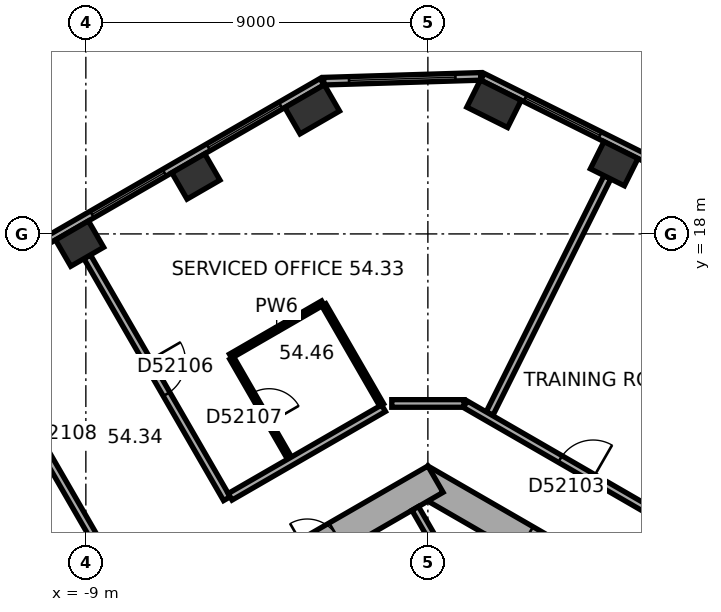
"""IFC4 building model, lengths in metres.
Left out: names, types, materials, properties, quantities, classifications, styles, units other than length and angle.
Written with IfcOpenShell. Run it as: python <this file> out.ifc"""

import sys

from ifc_helpers import new_model, si_unit, direction, frame, frame_2d, origin, origin_2d, place, context, subcontext, project, spatial, rectangle, extrude, element, fill, save


model = new_model("IFC4")
c1 = context("Model", 3, precision=1e-05, world=origin(), true_north=direction((0.0, 1.0)))
c2 = subcontext(c1, "Body", "Model", "MODEL_VIEW")
j1 = project(units=[si_unit("LENGTHUNIT", "METRE"), si_unit("PLANEANGLEUNIT", "RADIAN")], contexts=[c1])
p1 = place(None, origin())
s1 = spatial("IfcSite", under=j1, at=p1, CompositionType="ELEMENT")
p2 = place(p1, origin())
s2 = spatial("IfcBuilding", under=s1, at=p2, CompositionType="ELEMENT")
p3 = place(p2, frame((0.0, 0.0, 221.7)))
s3 = spatial("IfcBuildingStorey", under=s2, at=p3, CompositionType="ELEMENT", Elevation=221.7)
p4 = place(p3, frame((4.902, 19.848, 0.0), z_axis=(0.0, 0.0, 1.0), x_axis=(-0.894934361602, 0.44619781311, 0.0)))
e1 = element("IfcColumn", 1, at=p4, inside=s3, PredefinedType="COLUMN", context=c2, shape_type="SweptSolid", body=[
    extrude(rectangle(XDim=1.0, YDim=0.8, at=origin_2d()), origin(), (0.0, 0.0, 1.0), 3.7),
])
for number, where, z_axis, x_axis in (
    (2, (1.74, 21.425, 0.0), (0.0, 0.0, 1.0), (-0.895, 0.446, 0.0)),
    (3, (-3.044, 21.279, 0.0), (0.0, 0.0, 1.0), (-0.866, -0.5, 0.0)),
):
    element("IfcColumn", number, at=place(p3, frame(where, z_axis=z_axis, x_axis=x_axis)), inside=s3, PredefinedType="COLUMN", context=c2, shape_type="SweptSolid", body=[
        extrude(rectangle(XDim=1.2, YDim=0.8, at=origin_2d()), origin(), (0.0, 0.0, 1.0), 3.7),
    ])
for number, where, z_axis, x_axis in (
    (4, (-6.104, 19.512, 0.0), (0.0, 0.0, 1.0), (-0.866, -0.5, 0.0)),
    (5, (-9.165, 17.745, 0.0), (0.0, 0.0, 1.0), (-0.866, -0.5, 0.0)),
):
    element("IfcColumn", number, at=place(p3, frame(where, z_axis=z_axis, x_axis=x_axis)), inside=s3, PredefinedType="COLUMN", context=c2, shape_type="SweptSolid", body=[
        extrude(rectangle(XDim=1.0, YDim=0.8, at=origin_2d()), origin(), (0.0, 0.0, 1.0), 3.7),
    ])
p5 = place(p3, frame((10.1, 5.6, 0.0), z_axis=(0.0, 0.0, 1.0), x_axis=(-0.866023897231, 0.500002609418, 0.0)))
e6 = element("IfcWall", 6, at=p5, inside=s3, PredefinedType="SHEAR", context=c2, shape_type="SweptSolid", body=[
    extrude(rectangle(XDim=11.894, YDim=0.8, at=frame_2d((5.947, 0.0))), origin(), (0.0, 0.0, 1.0), 3.7),
])
p6 = place(p5, frame((3.897, 0.0, 0.0)))
e7 = element("IfcOpeningElement", 7, at=p6, cuts=e6, PredefinedType="OPENING", context=c2, shape_type="SweptSolid", body=[
    extrude(rectangle(XDim=0.9, YDim=2.1, at=frame_2d((0.45, 1.05))), frame((0.0, 0.41, 0.0), z_axis=(0.0, -1.0, 0.0), x_axis=(1.0, 0.0, 0.0)), (0.0, 0.0, 1.0), 0.82),
])
p7 = place(p5, frame((7.797, 0.0, 0.0)))
e8 = element("IfcOpeningElement", 8, at=p7, cuts=e6, PredefinedType="OPENING", context=c2, shape_type="SweptSolid", body=[
    extrude(rectangle(XDim=0.9, YDim=2.1, at=frame_2d((0.45, 1.05))), frame((0.0, 0.41, 0.0), z_axis=(0.0, -1.0, 0.0), x_axis=(1.0, 0.0, 0.0)), (0.0, 0.0, 1.0), 0.82),
])
p8 = place(p3, frame((0.2, 11.547, 0.0), z_axis=(0.0, 0.0, 1.0), x_axis=(-0.866023897231, -0.500002609418, 0.0)))
e9 = element("IfcWall", 9, at=p8, inside=s3, PredefinedType="SHEAR", context=c2, shape_type="SweptSolid", body=[
    extrude(rectangle(XDim=11.894, YDim=0.8, at=frame_2d((5.947, 0.0))), origin(), (0.0, 0.0, 1.0), 3.7),
])
p9 = place(p8, frame((6.147, 0.0, 0.0)))
e10 = element("IfcOpeningElement", 10, at=p9, cuts=e9, PredefinedType="OPENING", context=c2, shape_type="SweptSolid", body=[
    extrude(rectangle(XDim=1.5, YDim=2.1, at=frame_2d((0.75, 1.05))), frame((0.0, 0.41, 0.0), z_axis=(0.0, -1.0, 0.0), x_axis=(1.0, 0.0, 0.0)), (0.0, 0.0, 1.0), 0.82),
])
p10 = place(p8, frame((2.997, 0.0, 0.0)))
e11 = element("IfcOpeningElement", 11, at=p10, cuts=e9, PredefinedType="OPENING", context=c2, shape_type="SweptSolid", body=[
    extrude(rectangle(XDim=0.9, YDim=2.1, at=frame_2d((0.45, 1.05))), frame((0.0, 0.41, 0.0), z_axis=(0.0, -1.0, 0.0), x_axis=(1.0, 0.0, 0.0)), (0.0, 0.0, 1.0), 0.82),
])
p11 = place(p3, frame((18.299, 13.727, 0.0), z_axis=(0.0, 0.0, 1.0), x_axis=(-0.894934554817, 0.44619742558, 0.0)))
e12 = element("IfcWall", 12, at=p11, inside=s3, PredefinedType="STANDARD", context=c2, shape_type="SweptSolid", body=[
    extrude(rectangle(XDim=18.841, YDim=0.2, at=frame_2d((9.421, 0.0))), origin(), (0.0, 0.0, 1.0), 3.7),
])
p12 = place(p11, frame((1.253, 0.0, 0.9)))
e13 = element("IfcOpeningElement", 13, at=p12, cuts=e12, PredefinedType="OPENING", context=c2, shape_type="SweptSolid", body=[
    extrude(rectangle(XDim=2.2, YDim=2.0, at=frame_2d((1.1, 1.0))), frame((0.0, 0.11, 0.0), z_axis=(0.0, -1.0, 0.0), x_axis=(1.0, 0.0, 0.0)), (0.0, 0.0, 1.0), 0.22),
])
p13 = place(p11, frame((4.786, 0.0, 0.9)))
e14 = element("IfcOpeningElement", 14, at=p13, cuts=e12, PredefinedType="OPENING", context=c2, shape_type="SweptSolid", body=[
    extrude(rectangle(XDim=2.2, YDim=2.0, at=frame_2d((1.1, 1.0))), frame((0.0, 0.11, 0.0), z_axis=(0.0, -1.0, 0.0), x_axis=(1.0, 0.0, 0.0)), (0.0, 0.0, 1.0), 0.22),
])
p14 = place(p11, frame((8.32, 0.0, 0.9)))
e15 = element("IfcOpeningElement", 15, at=p14, cuts=e12, PredefinedType="OPENING", context=c2, shape_type="SweptSolid", body=[
    extrude(rectangle(XDim=2.2, YDim=2.0, at=frame_2d((1.1, 1.0))), frame((0.0, 0.11, 0.0), z_axis=(0.0, -1.0, 0.0), x_axis=(1.0, 0.0, 0.0)), (0.0, 0.0, 1.0), 0.22),
])
p15 = place(p11, frame((11.854, 0.0, 0.9)))
e16 = element("IfcOpeningElement", 16, at=p15, cuts=e12, PredefinedType="OPENING", context=c2, shape_type="SweptSolid", body=[
    extrude(rectangle(XDim=2.2, YDim=2.0, at=frame_2d((1.1, 1.0))), frame((0.0, 0.11, 0.0), z_axis=(0.0, -1.0, 0.0), x_axis=(1.0, 0.0, 0.0)), (0.0, 0.0, 1.0), 0.22),
])
p16 = place(p11, frame((15.387, 0.0, 0.9)))
e17 = element("IfcOpeningElement", 17, at=p16, cuts=e12, PredefinedType="OPENING", context=c2, shape_type="SweptSolid", body=[
    extrude(rectangle(XDim=2.2, YDim=2.0, at=frame_2d((1.1, 1.0))), frame((0.0, 0.11, 0.0), z_axis=(0.0, -1.0, 0.0), x_axis=(1.0, 0.0, 0.0)), (0.0, 0.0, 1.0), 0.22),
])
p17 = place(p3, frame((1.389, 22.145, 0.0), z_axis=(0.0, 0.0, 1.0), x_axis=(-0.999534702881, -0.030502093955, 0.0)))
e18 = element("IfcWall", 18, at=p17, inside=s3, PredefinedType="STANDARD", context=c2, shape_type="SweptSolid", body=[
    extrude(rectangle(XDim=4.13, YDim=0.2, at=frame_2d((2.065, 0.0))), origin(), (0.0, 0.0, 1.0), 3.7),
])
p18 = place(p17, frame((0.665, 0.0, 0.9)))
e19 = element("IfcOpeningElement", 19, at=p18, cuts=e18, PredefinedType="OPENING", context=c2, shape_type="SweptSolid", body=[
    extrude(rectangle(XDim=2.8, YDim=2.0, at=frame_2d((1.4, 1.0))), frame((0.0, 0.11, 0.0), z_axis=(0.0, -1.0, 0.0), x_axis=(1.0, 0.0, 0.0)), (0.0, 0.0, 1.0), 0.22),
])
p19 = place(p3, frame((-2.786, 22.005, 0.0), z_axis=(0.0, 0.0, 1.0), x_axis=(-0.866026555358, -0.49999800541, 0.0)))
e20 = element("IfcWall", 20, at=p19, inside=s3, PredefinedType="STANDARD", context=c2, shape_type="SweptSolid", body=[
    extrude(rectangle(XDim=18.841, YDim=0.2, at=frame_2d((9.421, 0.0))), origin(), (0.0, 0.0, 1.0), 3.7),
])
p20 = place(p19, frame((1.254, 0.0, 0.9)))
e21 = element("IfcOpeningElement", 21, at=p20, cuts=e20, PredefinedType="OPENING", context=c2, shape_type="SweptSolid", body=[
    extrude(rectangle(XDim=2.2, YDim=2.0, at=frame_2d((1.1, 1.0))), frame((0.0, 0.11, 0.0), z_axis=(0.0, -1.0, 0.0), x_axis=(1.0, 0.0, 0.0)), (0.0, 0.0, 1.0), 0.22),
])
p21 = place(p19, frame((4.788, 0.0, 0.9)))
e22 = element("IfcOpeningElement", 22, at=p21, cuts=e20, PredefinedType="OPENING", context=c2, shape_type="SweptSolid", body=[
    extrude(rectangle(XDim=2.2, YDim=2.0, at=frame_2d((1.1, 1.0))), frame((0.0, 0.11, 0.0), z_axis=(0.0, -1.0, 0.0), x_axis=(1.0, 0.0, 0.0)), (0.0, 0.0, 1.0), 0.22),
])
p22 = place(p19, frame((8.321, 0.0, 0.9)))
e23 = element("IfcOpeningElement", 23, at=p22, cuts=e20, PredefinedType="OPENING", context=c2, shape_type="SweptSolid", body=[
    extrude(rectangle(XDim=2.2, YDim=2.0, at=frame_2d((1.1, 1.0))), frame((0.0, 0.11, 0.0), z_axis=(0.0, -1.0, 0.0), x_axis=(1.0, 0.0, 0.0)), (0.0, 0.0, 1.0), 0.22),
])
p23 = place(p19, frame((11.855, 0.0, 0.9)))
e24 = element("IfcOpeningElement", 24, at=p23, cuts=e20, PredefinedType="OPENING", context=c2, shape_type="SweptSolid", body=[
    extrude(rectangle(XDim=2.2, YDim=2.0, at=frame_2d((1.1, 1.0))), frame((0.0, 0.11, 0.0), z_axis=(0.0, -1.0, 0.0), x_axis=(1.0, 0.0, 0.0)), (0.0, 0.0, 1.0), 0.22),
])
p24 = place(p19, frame((15.389, 0.0, 0.9)))
e25 = element("IfcOpeningElement", 25, at=p24, cuts=e20, PredefinedType="OPENING", context=c2, shape_type="SweptSolid", body=[
    extrude(rectangle(XDim=2.2, YDim=2.0, at=frame_2d((1.1, 1.0))), frame((0.0, 0.11, 0.0), z_axis=(0.0, -1.0, 0.0), x_axis=(1.0, 0.0, 0.0)), (0.0, 0.0, 1.0), 0.22),
])
p25 = place(p3, frame((0.767, 8.872, 0.0), z_axis=(0.0, 0.0, 1.0), x_axis=(-0.499994660107, 0.866028486751, 0.0)))
e26 = element("IfcWall", 26, at=p25, inside=s3, PredefinedType="PARTITIONING", context=c2, shape_type="SweptSolid", body=[
    extrude(rectangle(XDim=2.2, YDim=0.2, at=frame_2d((1.1, 0.0))), origin(), (0.0, 0.0, 1.0), 3.42),
])
p26 = place(p3, frame((-12.025, 15.632, 0.0), z_axis=(0.0, 0.0, 1.0), x_axis=(0.499983153418, -0.866035129944, 0.0)))
e27 = element("IfcWall", 27, at=p26, inside=s3, PredefinedType="PARTITIONING", context=c2, shape_type="SweptSolid", body=[
    extrude(rectangle(XDim=7.35, YDim=0.2, at=frame_2d((3.675, 0.0))), origin(), (0.0, 0.0, 1.0), 3.42),
])
p27 = place(p26, frame((3.175, 0.0, 0.0)))
e28 = element("IfcOpeningElement", 28, at=p27, cuts=e27, PredefinedType="OPENING", context=c2, shape_type="SweptSolid", body=[
    extrude(rectangle(XDim=1.0, YDim=2.1, at=frame_2d((0.5, 1.05))), frame((0.0, 0.11, 0.0), z_axis=(0.0, -1.0, 0.0), x_axis=(1.0, 0.0, 0.0)), (0.0, 0.0, 1.0), 0.22),
])
p28 = place(p3, frame((-8.965, 17.399, 0.0), z_axis=(0.0, 0.0, 1.0), x_axis=(0.499993683172, -0.866029050776, 0.0)))
e29 = element("IfcWall", 29, at=p28, inside=s3, PredefinedType="PARTITIONING", context=c2, shape_type="SweptSolid", body=[
    extrude(rectangle(XDim=7.35, YDim=0.2, at=frame_2d((3.675, 0.0))), origin(), (0.0, 0.0, 1.0), 2.87),
])
p29 = place(p28, frame((3.175, 0.0, 0.0)))
e30 = element("IfcOpeningElement", 30, at=p29, cuts=e29, PredefinedType="OPENING", context=c2, shape_type="SweptSolid", body=[
    extrude(rectangle(XDim=1.0, YDim=2.1, at=frame_2d((0.5, 1.05))), frame((0.0, 0.11, 0.0), z_axis=(0.0, -1.0, 0.0), x_axis=(1.0, 0.0, 0.0)), (0.0, 0.0, 1.0), 0.22),
])
p30 = place(p3, frame((-5.191, 14.785, 0.0), z_axis=(0.0, 0.0, 1.0), x_axis=(0.866034573852, 0.49998411664, 0.0)))
e31 = element("IfcWall", 31, at=p30, inside=s3, PredefinedType="PARTITIONING", context=c2, shape_type="SweptSolid", body=[
    extrude(rectangle(XDim=2.8, YDim=0.12, at=frame_2d((1.4, 0.0))), origin(), (0.0, 0.0, 1.0), 3.42),
])
p31 = place(p3, frame((-3.641, 12.101, 0.0), z_axis=(0.0, 0.0, 1.0), x_axis=(-0.500026023896, 0.86601037836, 0.0)))
e32 = element("IfcWall", 32, at=p31, inside=s3, PredefinedType="PARTITIONING", context=c2, shape_type="SweptSolid", body=[
    extrude(rectangle(XDim=3.04, YDim=0.12, at=frame_2d((1.52, 0.0))), origin(), (0.0, 0.0, 1.0), 3.42),
])
p32 = place(p31, frame((1.07, 0.0, 0.0)))
e33 = element("IfcOpeningElement", 33, at=p32, cuts=e32, PredefinedType="OPENING", context=c2, shape_type="SweptSolid", body=[
    extrude(rectangle(XDim=0.9, YDim=2.1, at=frame_2d((0.45, 1.05))), frame((0.0, 0.07, 0.0), z_axis=(0.0, -1.0, 0.0), x_axis=(1.0, 0.0, 0.0)), (0.0, 0.0, 1.0), 0.14),
])
p33 = place(p3, frame((-2.737, 16.133, 0.0), z_axis=(0.0, 0.0, 1.0), x_axis=(0.500026023896, -0.86601037836, 0.0)))
e34 = element("IfcWall", 34, at=p33, inside=s3, PredefinedType="PARTITIONING", context=c2, shape_type="SweptSolid", body=[
    extrude(rectangle(XDim=3.04, YDim=0.12, at=frame_2d((1.52, 0.0))), origin(), (0.0, 0.0, 1.0), 3.42),
])
p34 = place(p3, frame((-1.167, 13.414, 0.0), z_axis=(0.0, 0.0, 1.0), x_axis=(-0.866023347809, -0.500003561037, 0.0)))
e35 = element("IfcWall", 35, at=p34, inside=s3, PredefinedType="PARTITIONING", context=c2, shape_type="SweptSolid", body=[
    extrude(rectangle(XDim=4.661, YDim=0.2, at=frame_2d((2.331, 0.0))), origin(), (0.0, 0.0, 1.0), 3.42),
])
p35 = place(p3, frame((0.95, 13.539, 0.0), z_axis=(0.0, 0.0, 1.0), x_axis=(-1.0, 0.0, 0.0)))
e36 = element("IfcWall", 36, at=p35, inside=s3, PredefinedType="PARTITIONING", context=c2, shape_type="SweptSolid", body=[
    extrude(rectangle(XDim=1.9, YDim=0.2, at=frame_2d((0.95, 0.0))), origin(), (0.0, 0.0, 1.0), 3.42),
])
p36 = place(p3, frame((4.723, 19.49, 0.0), z_axis=(0.0, 0.0, 1.0), x_axis=(-0.446186614574, -0.894939944898, 0.0)))
e37 = element("IfcWall", 37, at=p36, inside=s3, PredefinedType="PARTITIONING", context=c2, shape_type="SweptSolid", body=[
    extrude(rectangle(XDim=6.944, YDim=0.2, at=frame_2d((3.472, 0.0))), origin(), (0.0, 0.0, 1.0), 2.87),
])
p37 = place(p3, frame((8.721, 9.052, 0.0), z_axis=(0.0, 0.0, 1.0), x_axis=(-0.866028125821, 0.499995285264, 0.0)))
e38 = element("IfcWall", 38, at=p37, inside=s3, PredefinedType="PARTITIONING", context=c2, shape_type="SweptSolid", body=[
    extrude(rectangle(XDim=8.934, YDim=0.2, at=frame_2d((4.467, 0.0))), origin(), (0.0, 0.0, 1.0), 3.42),
])
p38 = place(p37, frame((5.05, 0.0, 0.0)))
e39 = element("IfcOpeningElement", 39, at=p38, cuts=e38, PredefinedType="OPENING", context=c2, shape_type="SweptSolid", body=[
    extrude(rectangle(XDim=1.0, YDim=2.1, at=frame_2d((0.5, 1.05))), frame((0.0, 0.11, 0.0), z_axis=(0.0, -1.0, 0.0), x_axis=(1.0, 0.0, 0.0)), (0.0, 0.0, 1.0), 0.22),
])
p39 = place(p16, origin())
e40 = element("IfcWindow", 40, at=p39, inside=s3, PartitioningType="SINGLE_PANEL", PredefinedType="WINDOW", context=c2, shape_type="SweptSolid", body=[
    extrude(rectangle(XDim=2.2, YDim=2.0, at=frame_2d((1.1, 1.0))), frame((0.0, 0.03, 0.0), z_axis=(0.0, -1.0, 0.0), x_axis=(1.0, 0.0, 0.0)), (0.0, 0.0, 1.0), 0.06),
])
fill(e17, e40)
p40 = place(p18, origin())
e41 = element("IfcWindow", 41, at=p40, inside=s3, PartitioningType="SINGLE_PANEL", PredefinedType="WINDOW", context=c2, shape_type="SweptSolid", body=[
    extrude(rectangle(XDim=2.8, YDim=2.0, at=frame_2d((1.4, 1.0))), frame((0.0, 0.03, 0.0), z_axis=(0.0, -1.0, 0.0), x_axis=(1.0, 0.0, 0.0)), (0.0, 0.0, 1.0), 0.06),
])
fill(e19, e41)
p41 = place(p20, origin())
e42 = element("IfcWindow", 42, at=p41, inside=s3, PartitioningType="SINGLE_PANEL", PredefinedType="WINDOW", context=c2, shape_type="SweptSolid", body=[
    extrude(rectangle(XDim=2.2, YDim=2.0, at=frame_2d((1.1, 1.0))), frame((0.0, 0.03, 0.0), z_axis=(0.0, -1.0, 0.0), x_axis=(1.0, 0.0, 0.0)), (0.0, 0.0, 1.0), 0.06),
])
fill(e21, e42)
p42 = place(p21, origin())
e43 = element("IfcWindow", 43, at=p42, inside=s3, PartitioningType="SINGLE_PANEL", PredefinedType="WINDOW", context=c2, shape_type="SweptSolid", body=[
    extrude(rectangle(XDim=2.2, YDim=2.0, at=frame_2d((1.1, 1.0))), frame((0.0, 0.03, 0.0), z_axis=(0.0, -1.0, 0.0), x_axis=(1.0, 0.0, 0.0)), (0.0, 0.0, 1.0), 0.06),
])
fill(e22, e43)
p43 = place(p38, origin())
e44 = element("IfcDoor", 44, at=p43, inside=s3, OperationType="SINGLE_SWING_LEFT", PredefinedType="DOOR", context=c2, shape_type="SweptSolid", body=[
    extrude(rectangle(XDim=1.0, YDim=2.1, at=frame_2d((0.5, 1.05))), frame((0.0, 0.025, 0.0), z_axis=(0.0, -1.0, 0.0), x_axis=(1.0, 0.0, 0.0)), (0.0, 0.0, 1.0), 0.05),
])
fill(e39, e44)
p44 = place(p29, origin())
e45 = element("IfcDoor", 45, at=p44, inside=s3, OperationType="SINGLE_SWING_LEFT", PredefinedType="DOOR", context=c2, shape_type="SweptSolid", body=[
    extrude(rectangle(XDim=1.0, YDim=2.1, at=frame_2d((0.5, 1.05))), frame((0.0, 0.025, 0.0), z_axis=(0.0, -1.0, 0.0), x_axis=(1.0, 0.0, 0.0)), (0.0, 0.0, 1.0), 0.05),
])
fill(e30, e45)
p45 = place(p32, origin())
e46 = element("IfcDoor", 46, at=p45, inside=s3, OperationType="SINGLE_SWING_LEFT", PredefinedType="DOOR", context=c2, shape_type="SweptSolid", body=[
    extrude(rectangle(XDim=0.9, YDim=2.1, at=frame_2d((0.45, 1.05))), frame((0.0, 0.025, 0.0), z_axis=(0.0, -1.0, 0.0), x_axis=(1.0, 0.0, 0.0)), (0.0, 0.0, 1.0), 0.05),
])
fill(e33, e46)
save(model, sys.argv[1])
